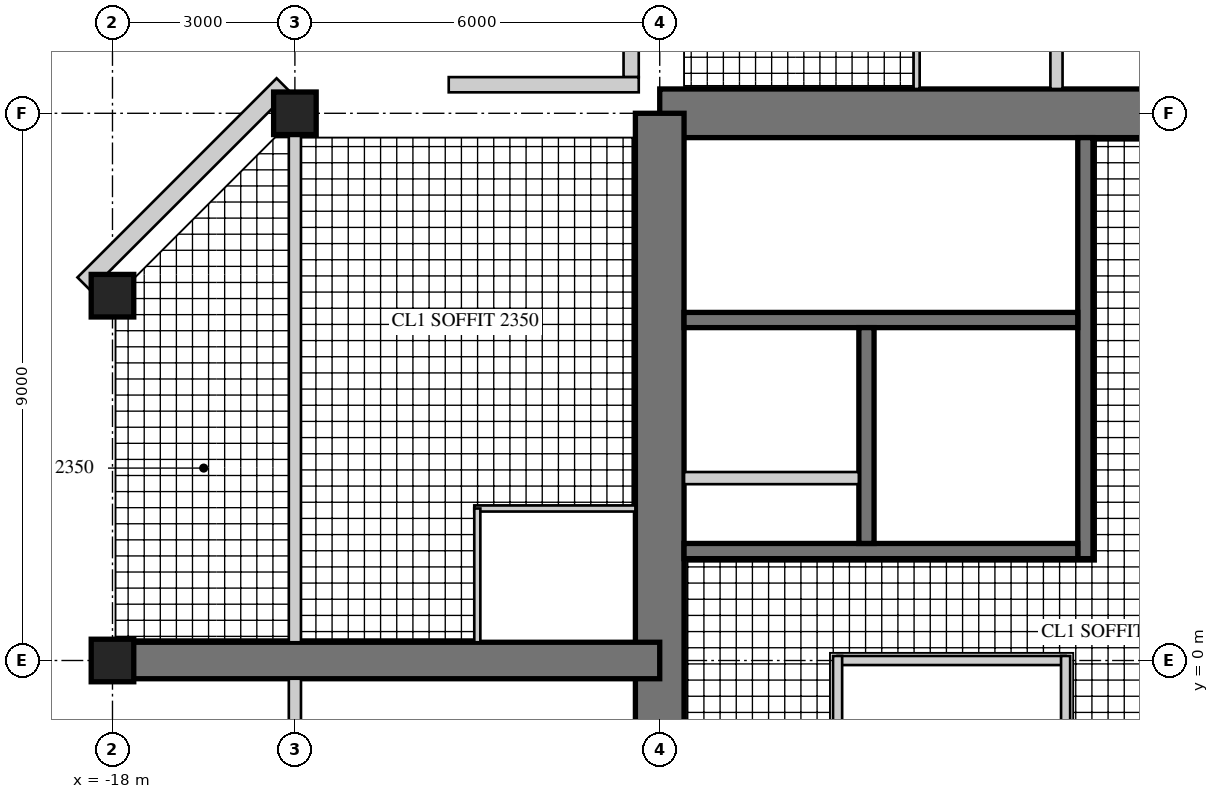
"""IFC4 building model, lengths in metres.
Left out: names, types, materials, properties, quantities, classifications, styles, units other than length and angle.
Written with IfcOpenShell. Run it as: python <this file> out.ifc"""

import sys

from ifc_helpers import new_model, si_unit, direction, frame, frame_2d, origin, origin_2d, place, context, subcontext, project, spatial, rectangle, hollow_rectangle, extrude, element, fill, save


model = new_model("IFC4")
c1 = context("Model", 3, precision=1e-05, world=origin(), true_north=direction((0.0, 1.0)))
c2 = subcontext(c1, "Body", "Model", "MODEL_VIEW")
j1 = project(units=[si_unit("LENGTHUNIT", "METRE"), si_unit("PLANEANGLEUNIT", "RADIAN")], contexts=[c1])
p1 = place(None, origin())
s1 = spatial("IfcSite", under=j1, at=p1, CompositionType="ELEMENT")
p2 = place(p1, origin())
s2 = spatial("IfcBuilding", under=s1, at=p2, CompositionType="ELEMENT")
p3 = place(p2, frame((0.0, 0.0, 267.9)))
s3 = spatial("IfcBuildingStorey", under=s2, at=p3, CompositionType="ELEMENT", Elevation=267.9)
p4 = place(p3, frame((9.0, 9.0, 0.0), z_axis=(0.0, 0.0, 1.0), x_axis=(-1.0, 0.0, 0.0)))
e1 = element("IfcWall", 1, at=p4, inside=s3, PredefinedType="SHEAR", context=c2, shape_type="SweptSolid", body=[
    extrude(rectangle(XDim=18.0, YDim=0.8, at=frame_2d((9.0, 0.0))), origin(), (0.0, 0.0, 1.0), 3.4),
])
p5 = place(p4, frame((9.8, 0.0, 0.0)))
e2 = element("IfcOpeningElement", 2, at=p5, cuts=e1, PredefinedType="OPENING", context=c2, shape_type="SweptSolid", body=[
    extrude(rectangle(XDim=1.0, YDim=2.4, at=frame_2d((0.5, 1.2))), frame((0.0, 0.41, 0.0), z_axis=(0.0, -1.0, 0.0), x_axis=(1.0, 0.0, 0.0)), (0.0, 0.0, 1.0), 0.82),
])
p6 = place(p3, frame((-9.0, 9.0, 0.0), z_axis=(0.0, 0.0, 1.0), x_axis=(0.0, -1.0, 0.0)))
e3 = element("IfcWall", 3, at=p6, inside=s3, PredefinedType="SHEAR", context=c2, shape_type="SweptSolid", body=[
    extrude(rectangle(XDim=18.0, YDim=0.8, at=frame_2d((9.0, 0.0))), origin(), (0.0, 0.0, 1.0), 3.4),
])
p7 = place(p6, frame((9.8, 0.0, 0.0)))
e4 = element("IfcOpeningElement", 4, at=p7, cuts=e3, PredefinedType="OPENING", context=c2, shape_type="SweptSolid", body=[
    extrude(rectangle(XDim=1.0, YDim=2.4, at=frame_2d((0.5, 1.2))), frame((0.0, 0.41, 0.0), z_axis=(0.0, -1.0, 0.0), x_axis=(1.0, 0.0, 0.0)), (0.0, 0.0, 1.0), 0.82),
])
p8 = place(p3, frame((-2.0, 1.675, 0.0), z_axis=(0.0, 0.0, 1.0), x_axis=(0.0, 1.0, 0.0)))
e5 = element("IfcWall", 5, at=p8, inside=s3, PredefinedType="SHEAR", context=c2, shape_type="SweptSolid", body=[
    extrude(rectangle(XDim=6.925, YDim=0.25, at=frame_2d((3.462, 0.0))), origin(), (0.0, 0.0, 1.0), 3.4),
])
p9 = place(p8, frame((0.725, 0.0, 0.0)))
e6 = element("IfcOpeningElement", 6, at=p9, cuts=e5, PredefinedType="OPENING", context=c2, shape_type="SweptSolid", body=[
    extrude(rectangle(XDim=1.0, YDim=2.1, at=frame_2d((0.5, 1.05))), frame((0.0, 0.135, 0.0), z_axis=(0.0, -1.0, 0.0), x_axis=(1.0, 0.0, 0.0)), (0.0, 0.0, 1.0), 0.27),
])
p10 = place(p3, frame((-2.125, 1.8, 0.0), z_axis=(0.0, 0.0, 1.0), x_axis=(-1.0, 0.0, 0.0)))
e7 = element("IfcWall", 7, at=p10, inside=s3, PredefinedType="SHEAR", context=c2, shape_type="SweptSolid", body=[
    extrude(rectangle(XDim=6.475, YDim=0.25, at=frame_2d((3.238, 0.0))), origin(), (0.0, 0.0, 1.0), 3.4),
])
p11 = place(p3, frame((-2.125, 5.6, 0.0), z_axis=(0.0, 0.0, 1.0), x_axis=(-1.0, 0.0, 0.0)))
e8 = element("IfcWall", 8, at=p11, inside=s3, PredefinedType="SHEAR", context=c2, shape_type="SweptSolid", body=[
    extrude(rectangle(XDim=6.475, YDim=0.25, at=frame_2d((3.238, 0.0))), origin(), (0.0, 0.0, 1.0), 3.4),
])
p12 = place(p11, frame((0.175, 0.0, 0.0)))
e9 = element("IfcOpeningElement", 9, at=p12, cuts=e8, PredefinedType="OPENING", context=c2, shape_type="SweptSolid", body=[
    extrude(rectangle(XDim=1.0, YDim=2.1, at=frame_2d((0.5, 1.05))), frame((0.0, 0.135, 0.0), z_axis=(0.0, -1.0, 0.0), x_axis=(1.0, 0.0, 0.0)), (0.0, 0.0, 1.0), 0.27),
])
p13 = place(p3, frame((-5.6, 1.925, 0.0), z_axis=(0.0, 0.0, 1.0), x_axis=(0.0, 1.0, 0.0)))
e10 = element("IfcWall", 10, at=p13, inside=s3, PredefinedType="SHEAR", context=c2, shape_type="SweptSolid", body=[
    extrude(rectangle(XDim=3.55, YDim=0.25, at=frame_2d((1.775, 0.0))), origin(), (0.0, 0.0, 1.0), 3.4),
])
p14 = place(p13, frame((1.525, 0.0, 0.0)))
e11 = element("IfcOpeningElement", 11, at=p14, cuts=e10, PredefinedType="OPENING", context=c2, shape_type="SweptSolid", body=[
    extrude(rectangle(XDim=1.1, YDim=2.2, at=frame_2d((0.55, 1.1))), frame((0.0, 0.135, 0.0), z_axis=(0.0, -1.0, 0.0), x_axis=(1.0, 0.0, 0.0)), (0.0, 0.0, 1.0), 0.27),
])
p15 = place(p13, frame((0.075, 0.0, 0.0)))
e12 = element("IfcOpeningElement", 12, at=p15, cuts=e10, PredefinedType="OPENING", context=c2, shape_type="SweptSolid", body=[
    extrude(rectangle(XDim=0.8, YDim=2.1, at=frame_2d((0.4, 1.05))), frame((0.0, 0.135, 0.0), z_axis=(0.0, -1.0, 0.0), x_axis=(1.0, 0.0, 0.0)), (0.0, 0.0, 1.0), 0.27),
])
p16 = place(p3, frame((-5.725, 3.0, 0.0), z_axis=(0.0, 0.0, 1.0), x_axis=(-1.0, 0.0, 0.0)))
e13 = element("IfcWall", 13, at=p16, inside=s3, PredefinedType="PARTITIONING", context=c2, shape_type="SweptSolid", body=[
    extrude(rectangle(XDim=2.875, YDim=0.2, at=frame_2d((1.438, 0.0))), origin(), (0.0, 0.0, 1.0), 3.4),
])
p17 = place(p3, frame((-9.0, 0.0, 0.0), z_axis=(0.0, 0.0, 1.0), x_axis=(-1.0, 0.0, 0.0)))
e14 = element("IfcWall", 14, at=p17, inside=s3, PredefinedType="SHEAR", context=c2, shape_type="SweptSolid", body=[
    extrude(rectangle(XDim=9.0, YDim=0.6, at=frame_2d((4.5, 0.0))), origin(), (0.0, 0.0, 1.0), 3.4),
])
p18 = place(p17, frame((3.8, 0.0, 0.0)))
e15 = element("IfcOpeningElement", 15, at=p18, cuts=e14, PredefinedType="OPENING", context=c2, shape_type="SweptSolid", body=[
    extrude(rectangle(XDim=1.0, YDim=2.15, at=frame_2d((0.5, 1.075))), frame((0.0, 0.31, 0.0), z_axis=(0.0, -1.0, 0.0), x_axis=(1.0, 0.0, 0.0)), (0.0, 0.0, 1.0), 0.62),
])
p19 = place(p17, frame((7.0, 0.0, 0.0)))
e16 = element("IfcOpeningElement", 16, at=p19, cuts=e14, PredefinedType="OPENING", context=c2, shape_type="SweptSolid", body=[
    extrude(rectangle(XDim=1.0, YDim=2.2, at=frame_2d((0.5, 1.1))), frame((0.0, 0.31, 0.0), z_axis=(0.0, -1.0, 0.0), x_axis=(1.0, 0.0, 0.0)), (0.0, 0.0, 1.0), 0.62),
])
for number, where, z_axis, x_axis in (
    (17, (-15.0, 9.0, 0.0), (0.0, 0.0, 1.0), (1.0, 0.0, 0.0)),
    (18, (-18.0, 6.0, 0.0), (0.0, 0.0, 1.0), (1.0, 0.0, 0.0)),
    (19, (-18.0, 0.0, 0.0), (0.0, 0.0, 1.0), (1.0, 0.0, 0.0)),
):
    element("IfcColumn", number, at=place(p3, frame(where, z_axis=z_axis, x_axis=x_axis)), inside=s3, PredefinedType="COLUMN", context=c2, shape_type="SweptSolid", body=[
        extrude(rectangle(XDim=0.7, YDim=0.7, at=origin_2d()), origin(), (0.0, 0.0, 1.0), 3.4),
    ])
p20 = place(p3, frame((-9.47, 12.47, 0.0), z_axis=(0.0, 0.0, 1.0), x_axis=(0.0, -1.0, 0.0)))
e20 = element("IfcWall", 20, at=p20, inside=s3, PredefinedType="SOLIDWALL", context=c2, shape_type="SweptSolid", body=[
    extrude(rectangle(XDim=2.875, YDim=0.25, at=frame_2d((1.438, 0.0))), origin(), (0.0, 0.0, 1.0), 3.22),
])
p21 = place(p20, frame((0.6, 0.0, 0.0)))
e21 = element("IfcOpeningElement", 21, at=p21, cuts=e20, PredefinedType="OPENING", context=c2, shape_type="SweptSolid", body=[
    extrude(rectangle(XDim=1.0, YDim=2.2, at=frame_2d((0.5, 1.1))), frame((0.0, 0.135, 0.0), z_axis=(0.0, -1.0, 0.0), x_axis=(1.0, 0.0, 0.0)), (0.0, 0.0, 1.0), 0.27),
])
p22 = place(p3, frame((-9.345, 9.47, 0.0), z_axis=(0.0, 0.0, 1.0), x_axis=(-1.0, 0.0, 0.0)))
e22 = element("IfcWall", 22, at=p22, inside=s3, PredefinedType="SOLIDWALL", context=c2, shape_type="SweptSolid", body=[
    extrude(rectangle(XDim=3.125, YDim=0.25, at=frame_2d((1.562, 0.0))), origin(), (0.0, 0.0, 1.0), 3.22),
])
p23 = place(p22, frame((0.6, 0.0, 0.0)))
e23 = element("IfcOpeningElement", 23, at=p23, cuts=e22, PredefinedType="OPENING", context=c2, shape_type="SweptSolid", body=[
    extrude(rectangle(XDim=1.0, YDim=2.2, at=frame_2d((0.5, 1.1))), frame((0.0, 0.135, 0.0), z_axis=(0.0, -1.0, 0.0), x_axis=(1.0, 0.0, 0.0)), (0.0, 0.0, 1.0), 0.27),
])
p24 = place(p3, frame((-15.195, 9.47, 0.0), z_axis=(0.0, 0.0, 1.0), x_axis=(-0.707106781187, -0.707106781187, 0.0)))
e24 = element("IfcWall", 24, at=p24, inside=s3, PredefinedType="SOLIDWALL", context=c2, shape_type="SweptSolid", body=[
    extrude(rectangle(XDim=4.632, YDim=0.3, at=frame_2d((2.316, 0.0))), origin(), (0.0, 0.0, 1.0), 3.22),
])
p25 = place(p24, frame((1.866, 0.0, 0.3)))
e25 = element("IfcOpeningElement", 25, at=p25, cuts=e24, PredefinedType="OPENING", context=c2, shape_type="SweptSolid", body=[
    extrude(rectangle(XDim=0.9, YDim=2.4, at=frame_2d((0.45, 1.2))), frame((0.0, 0.16, 0.0), z_axis=(0.0, -1.0, 0.0), x_axis=(1.0, 0.0, 0.0)), (0.0, 0.0, 1.0), 0.32),
])
p26 = place(p3, frame((-2.325, 0.0, 0.0), z_axis=(0.0, 0.0, 1.0), x_axis=(-1.0, 0.0, 0.0)))
e26 = element("IfcWall", 26, at=p26, inside=s3, PredefinedType="PARTITIONING", context=c2, shape_type="SweptSolid", body=[
    extrude(rectangle(XDim=3.75, YDim=0.15, at=frame_2d((1.875, 0.0))), origin(), (0.0, 0.0, 1.0), 3.22),
])
p27 = place(p26, frame((0.4, 0.0, 0.0)))
e27 = element("IfcOpeningElement", 27, at=p27, cuts=e26, PredefinedType="OPENING", context=c2, shape_type="SweptSolid", body=[
    extrude(rectangle(XDim=1.0, YDim=2.1, at=frame_2d((0.5, 1.05))), frame((0.0, 0.085, 0.0), z_axis=(0.0, -1.0, 0.0), x_axis=(1.0, 0.0, 0.0)), (0.0, 0.0, 1.0), 0.17),
])
for number, where, z_axis, x_axis in (
    (28, (-2.325, -1.875, 0.0), (0.0, 0.0, 1.0), (0.0, 1.0, 0.0)),
    (29, (-6.075, 0.075, 0.0), (0.0, 0.0, 1.0), (0.0, -1.0, 0.0)),
):
    element("IfcWall", number, at=place(p3, frame(where, z_axis=z_axis, x_axis=x_axis)), inside=s3, PredefinedType="PARTITIONING", context=c2, shape_type="SweptSolid", body=[
        extrude(rectangle(XDim=1.95, YDim=0.15, at=frame_2d((0.975, 0.0))), origin(), (0.0, 0.0, 1.0), 3.22),
    ])
p28 = place(p3, frame((-4.775, 9.4, 0.0), z_axis=(0.0, 0.0, 1.0), x_axis=(0.0, 1.0, 0.0)))
e30 = element("IfcWall", 30, at=p28, inside=s3, PredefinedType="PARTITIONING", context=c2, shape_type="SweptSolid", body=[
    extrude(rectangle(XDim=2.65, YDim=0.1, at=frame_2d((1.325, 0.0))), origin(), (0.0, 0.0, 1.0), 3.22),
])
p29 = place(p3, frame((-2.475, 9.4, 0.0), z_axis=(0.0, 0.0, 1.0), x_axis=(0.0, 1.0, 0.0)))
e31 = element("IfcWall", 31, at=p29, inside=s3, PredefinedType="SOLIDWALL", context=c2, shape_type="SweptSolid", body=[
    extrude(rectangle(XDim=5.6, YDim=0.2, at=frame_2d((2.8, 0.0))), origin(), (0.0, 0.0, 1.0), 3.22),
])
p30 = place(p29, frame((3.4, 0.0, 0.0)))
e32 = element("IfcOpeningElement", 32, at=p30, cuts=e31, PredefinedType="OPENING", context=c2, shape_type="SweptSolid", body=[
    extrude(rectangle(XDim=1.0, YDim=2.15, at=frame_2d((0.5, 1.075))), frame((0.0, 0.11, 0.0), z_axis=(0.0, -1.0, 0.0), x_axis=(1.0, 0.0, 0.0)), (0.0, 0.0, 1.0), 0.22),
])
p31 = place(p3, frame((-9.4, 2.5, 0.0), z_axis=(0.0, 0.0, 1.0), x_axis=(-1.0, 0.0, 0.0)))
e33 = element("IfcWall", 33, at=p31, inside=s3, PredefinedType="PARTITIONING", context=c2, shape_type="SweptSolid", body=[
    extrude(rectangle(XDim=2.65, YDim=0.1, at=frame_2d((1.325, 0.0))), origin(), (0.0, 0.0, 1.0), 3.22),
])
p32 = place(p3, frame((-12.0, 2.5, 0.0), z_axis=(0.0, 0.0, 1.0), x_axis=(0.0, -1.0, 0.0)))
e34 = element("IfcWall", 34, at=p32, inside=s3, PredefinedType="PARTITIONING", context=c2, shape_type="SweptSolid", body=[
    extrude(rectangle(XDim=2.2, YDim=0.1, at=frame_2d((1.1, 0.0))), origin(), (0.0, 0.0, 1.0), 3.22),
])
p33 = place(p32, frame((0.55, 0.0, 0.0)))
e35 = element("IfcOpeningElement", 35, at=p33, cuts=e34, PredefinedType="OPENING", context=c2, shape_type="SweptSolid", body=[
    extrude(rectangle(XDim=0.9, YDim=2.1, at=frame_2d((0.45, 1.05))), frame((0.0, 0.06, 0.0), z_axis=(0.0, -1.0, 0.0), x_axis=(1.0, 0.0, 0.0)), (0.0, 0.0, 1.0), 0.12),
])
p34 = place(p3, frame((-15.0, 8.65, 0.0), z_axis=(0.0, 0.0, 1.0), x_axis=(0.0, -1.0, 0.0)))
e36 = element("IfcWall", 36, at=p34, inside=s3, PredefinedType="SOLIDWALL", context=c2, shape_type="SweptSolid", body=[
    extrude(rectangle(XDim=8.35, YDim=0.2, at=frame_2d((4.175, 0.0))), origin(), (0.0, 0.0, 1.0), 2.52),
])
p35 = place(p3, frame((-15.0, -0.3, 0.0), z_axis=(0.0, 0.0, 1.0), x_axis=(0.0, -1.0, 0.0)))
e37 = element("IfcWall", 37, at=p35, inside=s3, PredefinedType="SOLIDWALL", context=c2, shape_type="SweptSolid", body=[
    extrude(rectangle(XDim=8.35, YDim=0.2, at=frame_2d((4.175, 0.0))), origin(), (0.0, 0.0, 1.0), 2.52),
])
p36 = place(p35, frame((0.4, 0.0, 0.0)))
e38 = element("IfcOpeningElement", 38, at=p36, cuts=e37, PredefinedType="OPENING", context=c2, shape_type="SweptSolid", body=[
    extrude(rectangle(XDim=1.0, YDim=2.2, at=frame_2d((0.5, 1.1))), frame((0.0, 0.11, 0.0), z_axis=(0.0, -1.0, 0.0), x_axis=(1.0, 0.0, 0.0)), (0.0, 0.0, 1.0), 0.22),
])
p37 = place(p23, origin())
e39 = element("IfcDoor", 39, at=p37, inside=s3, OperationType="SINGLE_SWING_LEFT", PredefinedType="DOOR", context=c2, shape_type="SweptSolid", body=[
    extrude(hollow_rectangle(XDim=1.0, YDim=2.2, WallThickness=0.06, at=frame_2d((0.5, 1.1))), frame((0.0, 0.025, 0.0), z_axis=(0.0, -1.0, 0.0), x_axis=(1.0, 0.0, 0.0)), (0.0, 0.0, 1.0), 0.05),
    extrude(rectangle(XDim=0.879, YDim=2.079, at=frame_2d((0.5, 1.1))), frame((0.0, 0.025, 0.0), z_axis=(0.0, -1.0, 0.0), x_axis=(1.0, 0.0, 0.0)), (0.0, 0.0, 1.0), 0.05),
])
fill(e23, e39)
p38 = place(p25, origin())
e40 = element("IfcWindow", 40, at=p38, inside=s3, PartitioningType="SINGLE_PANEL", PredefinedType="WINDOW", context=c2, shape_type="SweptSolid", body=[
    extrude(hollow_rectangle(XDim=0.9, YDim=2.4, WallThickness=0.06, at=frame_2d((0.45, 1.2))), frame((0.0, 0.03, 0.0), z_axis=(0.0, -1.0, 0.0), x_axis=(1.0, 0.0, 0.0)), (0.0, 0.0, 1.0), 0.06),
    extrude(rectangle(XDim=0.779, YDim=2.279, at=frame_2d((0.45, 1.2))), frame((0.0, 0.03, 0.0), z_axis=(0.0, -1.0, 0.0), x_axis=(1.0, 0.0, 0.0)), (0.0, 0.0, 1.0), 0.06),
])
fill(e25, e40)
p39 = place(p27, origin())
e41 = element("IfcDoor", 41, at=p39, inside=s3, OperationType="SINGLE_SWING_LEFT", PredefinedType="DOOR", context=c2, shape_type="SweptSolid", body=[
    extrude(rectangle(XDim=1.0, YDim=2.1, at=frame_2d((0.5, 1.05))), frame((0.0, 0.025, 0.0), z_axis=(0.0, -1.0, 0.0), x_axis=(1.0, 0.0, 0.0)), (0.0, 0.0, 1.0), 0.05),
])
fill(e27, e41)
p40 = place(p33, origin())
e42 = element("IfcDoor", 42, at=p40, inside=s3, OperationType="SINGLE_SWING_LEFT", PredefinedType="DOOR", context=c2, shape_type="SweptSolid", body=[
    extrude(rectangle(XDim=0.9, YDim=2.1, at=frame_2d((0.45, 1.05))), frame((0.0, 0.025, 0.0), z_axis=(0.0, -1.0, 0.0), x_axis=(1.0, 0.0, 0.0)), (0.0, 0.0, 1.0), 0.05),
])
fill(e35, e42)
p41 = place(p36, frame((1.0, 0.0, 0.0), z_axis=(0.0, 0.0, 1.0), x_axis=(-1.0, 0.0, 0.0)))
e43 = element("IfcDoor", 43, at=p41, inside=s3, OperationType="SINGLE_SWING_LEFT", PredefinedType="DOOR", context=c2, shape_type="SweptSolid", body=[
    extrude(rectangle(XDim=1.0, YDim=2.2, at=frame_2d((0.5, 1.1))), frame((0.0, 0.025, 0.0), z_axis=(0.0, -1.0, 0.0), x_axis=(1.0, 0.0, 0.0)), (0.0, 0.0, 1.0), 0.05),
])
fill(e38, e43)
p42 = place(p18, frame((1.0, 0.0, 0.0), z_axis=(0.0, 0.0, 1.0), x_axis=(-1.0, 0.0, 0.0)))
e44 = element("IfcDoor", 44, at=p42, inside=s3, OperationType="SINGLE_SWING_RIGHT", PredefinedType="DOOR", context=c2, shape_type="SweptSolid", body=[
    extrude(rectangle(XDim=1.0, YDim=2.15, at=frame_2d((0.5, 1.075))), frame((0.0, 0.025, 0.0), z_axis=(0.0, -1.0, 0.0), x_axis=(1.0, 0.0, 0.0)), (0.0, 0.0, 1.0), 0.05),
])
fill(e15, e44)
p43 = place(p19, origin())
e45 = element("IfcDoor", 45, at=p43, inside=s3, OperationType="SINGLE_SWING_LEFT", PredefinedType="DOOR", context=c2, shape_type="SweptSolid", body=[
    extrude(rectangle(XDim=1.0, YDim=2.2, at=frame_2d((0.5, 1.1))), frame((0.0, 0.025, 0.0), z_axis=(0.0, -1.0, 0.0), x_axis=(1.0, 0.0, 0.0)), (0.0, 0.0, 1.0), 0.05),
])
fill(e16, e45)
p44 = place(p5, origin())
e46 = element("IfcDoor", 46, at=p44, inside=s3, OperationType="SINGLE_SWING_RIGHT", PredefinedType="DOOR", context=c2, shape_type="SweptSolid", body=[
    extrude(rectangle(XDim=1.0, YDim=2.4, at=frame_2d((0.5, 1.2))), frame((0.0, 0.055, 0.0), z_axis=(0.0, -1.0, 0.0), x_axis=(1.0, 0.0, 0.0)), (0.0, 0.0, 1.0), 0.05),
])
fill(e2, e46)
p45 = place(p7, origin())
e47 = element("IfcDoor", 47, at=p45, inside=s3, OperationType="SINGLE_SWING_RIGHT", PredefinedType="DOOR", context=c2, shape_type="SweptSolid", body=[
    extrude(rectangle(XDim=1.0, YDim=2.4, at=frame_2d((0.5, 1.2))), frame((0.0, 0.055, 0.0), z_axis=(0.0, -1.0, 0.0), x_axis=(1.0, 0.0, 0.0)), (0.0, 0.0, 1.0), 0.05),
])
fill(e4, e47)
p46 = place(p9, origin())
e48 = element("IfcDoor", 48, at=p46, inside=s3, OperationType="SINGLE_SWING_LEFT", PredefinedType="DOOR", context=c2, shape_type="SweptSolid", body=[
    extrude(rectangle(XDim=1.0, YDim=2.1, at=frame_2d((0.5, 1.05))), frame((0.0, 0.025, 0.0), z_axis=(0.0, -1.0, 0.0), x_axis=(1.0, 0.0, 0.0)), (0.0, 0.0, 1.0), 0.05),
])
fill(e6, e48)
p47 = place(p12, frame((1.0, 0.0, 0.0), z_axis=(0.0, 0.0, 1.0), x_axis=(-1.0, 0.0, 0.0)))
e49 = element("IfcDoor", 49, at=p47, inside=s3, OperationType="SINGLE_SWING_RIGHT", PredefinedType="DOOR", context=c2, shape_type="SweptSolid", body=[
    extrude(rectangle(XDim=1.0, YDim=2.1, at=frame_2d((0.5, 1.05))), frame((0.0, 0.025, 0.0), z_axis=(0.0, -1.0, 0.0), x_axis=(1.0, 0.0, 0.0)), (0.0, 0.0, 1.0), 0.05),
])
fill(e9, e49)
p48 = place(p14, origin())
e50 = element("IfcDoor", 50, at=p48, inside=s3, OperationType="DOUBLE_DOOR_SLIDING", PredefinedType="DOOR", context=c2, shape_type="SweptSolid", body=[
    extrude(rectangle(XDim=1.1, YDim=2.2, at=frame_2d((0.55, 1.1))), frame((0.0, 0.025, 0.0), z_axis=(0.0, -1.0, 0.0), x_axis=(1.0, 0.0, 0.0)), (0.0, 0.0, 1.0), 0.05),
])
fill(e11, e50)
p49 = place(p15, origin())
e51 = element("IfcDoor", 51, at=p49, inside=s3, OperationType="SINGLE_SWING_LEFT", PredefinedType="DOOR", context=c2, shape_type="SweptSolid", body=[
    extrude(rectangle(XDim=0.8, YDim=2.1, at=frame_2d((0.4, 1.05))), frame((0.0, 0.025, 0.0), z_axis=(0.0, -1.0, 0.0), x_axis=(1.0, 0.0, 0.0)), (0.0, 0.0, 1.0), 0.05),
])
fill(e12, e51)
save(model, sys.argv[1])
